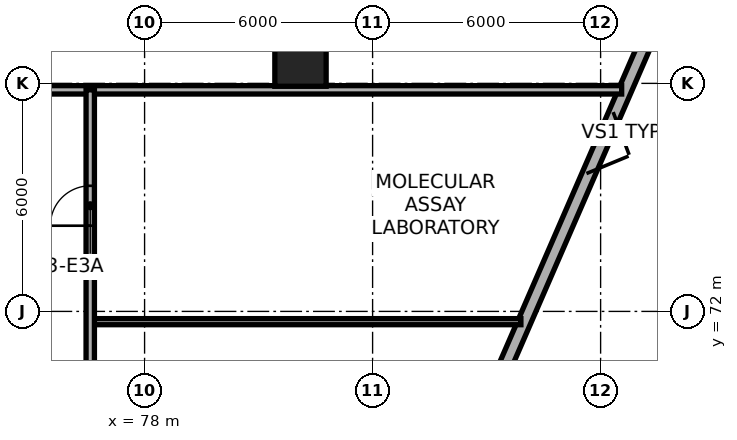
"""IFC4 building model, lengths in metres.
Left out: names, types, materials, properties, quantities, classifications, styles, units other than length and angle.
Written with IfcOpenShell. Run it as: python <this file> out.ifc"""

import sys

from ifc_helpers import new_model, si_unit, direction, frame, frame_2d, origin, origin_2d, place, context, subcontext, project, spatial, rectangle, extrude, element, fill, save


model = new_model("IFC4")
c1 = context("Model", 3, precision=1e-05, world=origin(), true_north=direction((0.0, 1.0)))
c2 = subcontext(c1, "Body", "Model", "MODEL_VIEW")
j1 = project(units=[si_unit("LENGTHUNIT", "METRE"), si_unit("PLANEANGLEUNIT", "RADIAN")], contexts=[c1])
p1 = place(None, origin())
s1 = spatial("IfcSite", under=j1, at=p1, CompositionType="ELEMENT")
p2 = place(p1, origin())
s2 = spatial("IfcBuilding", under=s1, at=p2, CompositionType="ELEMENT")
p3 = place(p2, frame((0.0, 0.0, 201.3)))
s3 = spatial("IfcBuildingStorey", under=s2, at=p3, CompositionType="ELEMENT", Elevation=201.3)
p4 = place(p3, frame((82.102, 78.599, 0.0), z_axis=(0.0, 0.0, 1.0), x_axis=(1.0, 0.0, 0.0)))
e1 = element("IfcColumn", 1, at=p4, inside=s3, PredefinedType="COLUMN", context=c2, shape_type="SweptSolid", body=[
    extrude(rectangle(XDim=1.35, YDim=1.35, at=origin_2d()), origin(), (0.0, 0.0, 1.0), 3.65),
])
p5 = place(p3, frame((91.334, 79.412, 0.0), z_axis=(0.0, 0.0, 1.0), x_axis=(-0.398629672145, -0.917111980341, 0.0)))
e2 = element("IfcWall", 2, at=p5, inside=s3, PredefinedType="STANDARD", context=c2, shape_type="SweptSolid", body=[
    extrude(rectangle(XDim=19.995, YDim=0.34, at=frame_2d((9.998, 0.0))), origin(), (0.0, 0.0, 1.0), 0.85),
])
p6 = place(p3, frame((41.446, 77.83, 0.0), z_axis=(0.0, 0.0, 1.0), x_axis=(1.0, 0.0, 0.0)))
e3 = element("IfcWall", 3, at=p6, inside=s3, PredefinedType="PARTITIONING", context=c2, shape_type="SweptSolid", body=[
    extrude(rectangle(XDim=49.108, YDim=0.22, at=frame_2d((24.554, 0.0))), origin(), (0.0, 0.0, 1.0), 2.6),
])
p7 = place(p6, frame((18.114, 0.0, 0.0)))
e4 = element("IfcOpeningElement", 4, at=p7, cuts=e3, PredefinedType="OPENING", context=c2, shape_type="SweptSolid", body=[
    extrude(rectangle(XDim=0.98, YDim=2.1, at=frame_2d((0.49, 1.05))), frame((0.0, 0.12, 0.0), z_axis=(0.0, -1.0, 0.0), x_axis=(1.0, 0.0, 0.0)), (0.0, 0.0, 1.0), 0.24),
])
p8 = place(p6, frame((20.939, 0.0, 0.0)))
e5 = element("IfcOpeningElement", 5, at=p8, cuts=e3, PredefinedType="OPENING", context=c2, shape_type="SweptSolid", body=[
    extrude(rectangle(XDim=0.98, YDim=2.1, at=frame_2d((0.49, 1.05))), frame((0.0, 0.12, 0.0), z_axis=(0.0, -1.0, 0.0), x_axis=(1.0, 0.0, 0.0)), (0.0, 0.0, 1.0), 0.24),
])
p9 = place(p6, frame((31.676, 0.0, 0.0)))
e6 = element("IfcOpeningElement", 6, at=p9, cuts=e3, PredefinedType="OPENING", context=c2, shape_type="SweptSolid", body=[
    extrude(rectangle(XDim=1.0, YDim=2.1, at=frame_2d((0.5, 1.05))), frame((0.0, 0.12, 0.0), z_axis=(0.0, -1.0, 0.0), x_axis=(1.0, 0.0, 0.0)), (0.0, 0.0, 1.0), 0.24),
])
p10 = place(p3, frame((76.57, 71.73, 0.0), z_axis=(0.0, 0.0, 1.0), x_axis=(1.0, 0.0, 0.0)))
e7 = element("IfcWall", 7, at=p10, inside=s3, PredefinedType="PARTITIONING", context=c2, shape_type="SweptSolid", body=[
    extrude(rectangle(XDim=11.333, YDim=0.16, at=frame_2d((5.666, 0.0))), origin(), (0.0, 0.0, 1.0), 2.6),
])
p11 = place(p3, frame((76.57, 59.53, 0.0), z_axis=(0.0, 0.0, 1.0), x_axis=(0.0, 1.0, 0.0)))
e8 = element("IfcWall", 8, at=p11, inside=s3, PredefinedType="PARTITIONING", context=c2, shape_type="SweptSolid", body=[
    extrude(rectangle(XDim=18.3, YDim=0.22, at=frame_2d((9.15, 0.0))), origin(), (0.0, 0.0, 1.0), 2.78),
])
p12 = place(p11, frame((2.525, 0.0, 0.0)))
e9 = element("IfcOpeningElement", 9, at=p12, cuts=e8, PredefinedType="OPENING", context=c2, shape_type="SweptSolid", body=[
    extrude(rectangle(XDim=1.05, YDim=2.15, at=frame_2d((0.525, 1.075))), frame((0.0, 0.12, 0.0), z_axis=(0.0, -1.0, 0.0), x_axis=(1.0, 0.0, 0.0)), (0.0, 0.0, 1.0), 0.24),
])
p13 = place(p11, frame((8.625, 0.0, 0.0)))
e10 = element("IfcOpeningElement", 10, at=p13, cuts=e8, PredefinedType="OPENING", context=c2, shape_type="SweptSolid", body=[
    extrude(rectangle(XDim=1.05, YDim=2.15, at=frame_2d((0.525, 1.075))), frame((0.0, 0.12, 0.0), z_axis=(0.0, -1.0, 0.0), x_axis=(1.0, 0.0, 0.0)), (0.0, 0.0, 1.0), 0.24),
])
p14 = place(p11, frame((14.725, 0.0, 0.0)))
e11 = element("IfcOpeningElement", 11, at=p14, cuts=e8, PredefinedType="OPENING", context=c2, shape_type="SweptSolid", body=[
    extrude(rectangle(XDim=1.05, YDim=2.15, at=frame_2d((0.525, 1.075))), frame((0.0, 0.12, 0.0), z_axis=(0.0, -1.0, 0.0), x_axis=(1.0, 0.0, 0.0)), (0.0, 0.0, 1.0), 0.24),
])
p15 = place(p14, origin())
e12 = element("IfcDoor", 12, at=p15, inside=s3, OperationType="SINGLE_SWING_LEFT", PredefinedType="DOOR", context=c2, shape_type="SweptSolid", body=[
    extrude(rectangle(XDim=1.05, YDim=2.15, at=frame_2d((0.525, 1.075))), frame((0.0, 0.025, 0.0), z_axis=(0.0, -1.0, 0.0), x_axis=(1.0, 0.0, 0.0)), (0.0, 0.0, 1.0), 0.05),
])
fill(e11, e12)
save(model, sys.argv[1])
